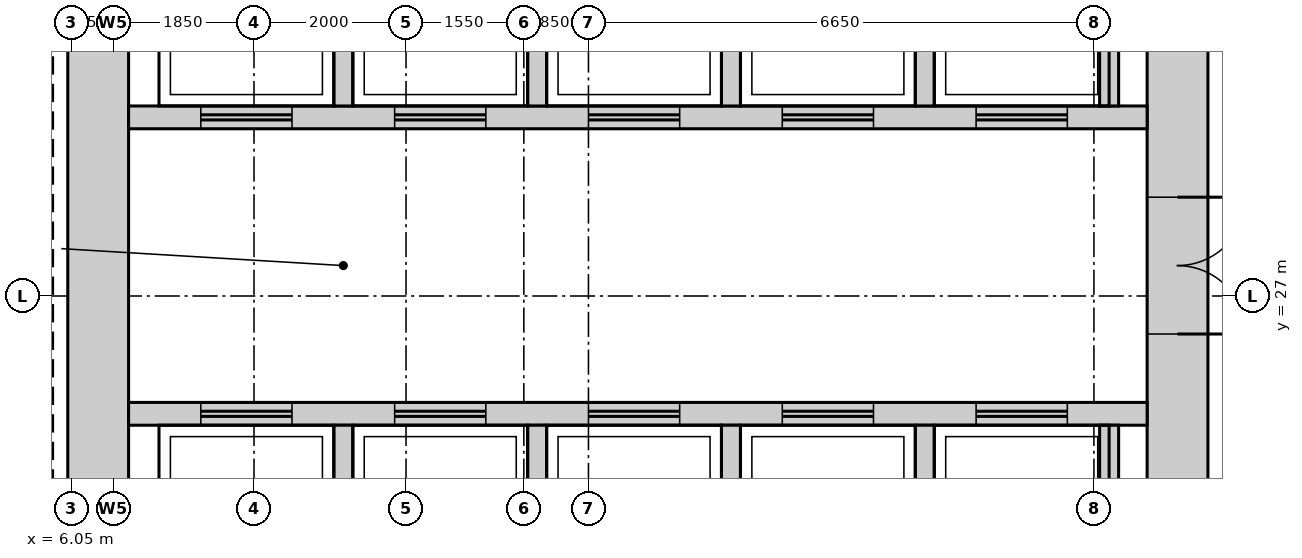
"""IFC4 building model, lengths in metres.
Left out: names, types, materials, properties, quantities, classifications, styles, units other than length and angle.
Written with IfcOpenShell. Run it as: python <this file> out.ifc"""

import sys

from ifc_helpers import new_model, si_unit, direction, frame, frame_2d, origin, place, context, subcontext, project, spatial, rectangle, extrude, source, transform, mapped, element, fill, save


model = new_model("IFC4")
c1 = context("Model", 3, precision=1e-05, world=origin(), true_north=direction((0.0, 1.0)))
c2 = subcontext(c1, "Body", "Model", "MODEL_VIEW")
j1 = project(units=[si_unit("LENGTHUNIT", "METRE"), si_unit("PLANEANGLEUNIT", "RADIAN")], contexts=[c1])
p1 = place(None, origin())
s1 = spatial("IfcSite", under=j1, at=p1, CompositionType="ELEMENT")
p2 = place(p1, origin())
s2 = spatial("IfcBuilding", under=s1, at=p2, CompositionType="ELEMENT")
p3 = place(p2, frame((0.0, 0.0, 204.7)))
s3 = spatial("IfcBuildingStorey", under=s2, at=p3, CompositionType="ELEMENT", Elevation=204.7)
m1 = source(origin(), c2, "Body", "SweptSolid", [
    extrude(rectangle(XDim=22.4, YDim=0.8, at=frame_2d((11.2, 0.0))), origin(), (0.0, 0.0, 1.0), 3.75),
])
p4 = place(p3, frame((20.6, 15.8, 0.0), z_axis=(0.0, 0.0, 1.0), x_axis=(0.0, 1.0, 0.0)))
e1 = element("IfcWall", 1, at=p4, inside=s3, PredefinedType="SHEAR", context=c2, shape_type="MappedRepresentation", body=[
    mapped(m1, transform((0.0, 0.0, 0.0))),
])
m2 = source(origin(), c2, "Body", "SweptSolid", [
    extrude(rectangle(XDim=1.8, YDim=2.1, at=frame_2d((0.9, 1.05))), frame((0.0, 0.41, 0.0), z_axis=(0.0, -1.0, 0.0), x_axis=(1.0, 0.0, 0.0)), (0.0, 0.0, 1.0), 0.82),
])
p5 = place(p4, frame((10.7, 0.0, 0.0)))
e2 = element("IfcOpeningElement", 2, at=p5, cuts=e1, PredefinedType="OPENING", context=c2, shape_type="MappedRepresentation", body=[
    mapped(m2, transform((0.0, 0.0, 0.0))),
])
m3 = source(origin(), c2, "Body", "SweptSolid", [
    extrude(rectangle(XDim=0.9, YDim=2.1, at=frame_2d((0.45, 1.05))), frame((0.0, 0.41, 0.0), z_axis=(0.0, -1.0, 0.0), x_axis=(1.0, 0.0, 0.0)), (0.0, 0.0, 1.0), 0.82),
])
p6 = place(p4, frame((0.35, 0.0, 0.0)))
e3 = element("IfcOpeningElement", 3, at=p6, cuts=e1, PredefinedType="OPENING", context=c2, shape_type="MappedRepresentation", body=[
    mapped(m3, transform((0.0, 0.0, 0.0))),
])
p7 = place(p4, frame((2.8, 0.0, 0.0)))
e4 = element("IfcOpeningElement", 4, at=p7, cuts=e1, PredefinedType="OPENING", context=c2, shape_type="MappedRepresentation", body=[
    mapped(m3, transform((0.0, 0.0, 0.0))),
])
m4 = source(origin(), c2, "Body", "SweptSolid", [
    extrude(rectangle(XDim=1.0, YDim=2.1, at=frame_2d((0.5, 1.05))), frame((0.0, 0.41, 0.0), z_axis=(0.0, -1.0, 0.0), x_axis=(1.0, 0.0, 0.0)), (0.0, 0.0, 1.0), 0.82),
])
p8 = place(p4, frame((5.5, 0.0, 0.0)))
e5 = element("IfcOpeningElement", 5, at=p8, cuts=e1, PredefinedType="OPENING", context=c2, shape_type="MappedRepresentation", body=[
    mapped(m4, transform((0.0, 0.0, 0.0))),
])
p9 = place(p3, frame((6.4, 15.8, 0.0), z_axis=(0.0, 0.0, 1.0), x_axis=(0.0, 1.0, 0.0)))
e6 = element("IfcWall", 6, at=p9, inside=s3, PredefinedType="SHEAR", context=c2, shape_type="MappedRepresentation", body=[
    mapped(m1, transform((0.0, 0.0, 0.0))),
])
m5 = source(origin(), c2, "Body", "SweptSolid", [
    extrude(rectangle(XDim=13.4, YDim=0.3, at=frame_2d((6.7, 0.0))), origin(), (0.0, 0.0, 1.0), 3.75),
])
p10 = place(p3, frame((6.8, 29.35, 0.0), z_axis=(0.0, 0.0, 1.0), x_axis=(1.0, 0.0, 0.0)))
e7 = element("IfcWall", 7, at=p10, inside=s3, PredefinedType="STANDARD", context=c2, shape_type="MappedRepresentation", body=[
    mapped(m5, transform((0.0, 0.0, 0.0))),
])
m6 = source(origin(), c2, "Body", "SweptSolid", [
    extrude(rectangle(XDim=1.2, YDim=2.1, at=frame_2d((0.6, 1.05))), frame((0.0, 0.16, 0.0), z_axis=(0.0, -1.0, 0.0), x_axis=(1.0, 0.0, 0.0)), (0.0, 0.0, 1.0), 0.32),
])
p11 = place(p10, frame((0.95, 0.0, 0.0)))
e8 = element("IfcOpeningElement", 8, at=p11, cuts=e7, PredefinedType="OPENING", context=c2, shape_type="MappedRepresentation", body=[
    mapped(m6, transform((0.0, 0.0, 0.0))),
])
p12 = place(p10, frame((3.5, 0.0, 0.0)))
e9 = element("IfcOpeningElement", 9, at=p12, cuts=e7, PredefinedType="OPENING", context=c2, shape_type="MappedRepresentation", body=[
    mapped(m6, transform((0.0, 0.0, 0.0))),
])
p13 = place(p10, frame((6.05, 0.0, 0.0)))
e10 = element("IfcOpeningElement", 10, at=p13, cuts=e7, PredefinedType="OPENING", context=c2, shape_type="MappedRepresentation", body=[
    mapped(m6, transform((0.0, 0.0, 0.0))),
])
p14 = place(p10, frame((8.6, 0.0, 0.0)))
e11 = element("IfcOpeningElement", 11, at=p14, cuts=e7, PredefinedType="OPENING", context=c2, shape_type="MappedRepresentation", body=[
    mapped(m6, transform((0.0, 0.0, 0.0))),
])
p15 = place(p10, frame((11.15, 0.0, 0.0)))
e12 = element("IfcOpeningElement", 12, at=p15, cuts=e7, PredefinedType="OPENING", context=c2, shape_type="MappedRepresentation", body=[
    mapped(m6, transform((0.0, 0.0, 0.0))),
])
p16 = place(p3, frame((6.8, 25.45, 0.0), z_axis=(0.0, 0.0, 1.0), x_axis=(1.0, 0.0, 0.0)))
e13 = element("IfcWall", 13, at=p16, inside=s3, PredefinedType="STANDARD", context=c2, shape_type="MappedRepresentation", body=[
    mapped(m5, transform((0.0, 0.0, 0.0))),
])
p17 = place(p16, frame((0.95, 0.0, 0.0)))
e14 = element("IfcOpeningElement", 14, at=p17, cuts=e13, PredefinedType="OPENING", context=c2, shape_type="MappedRepresentation", body=[
    mapped(m6, transform((0.0, 0.0, 0.0))),
])
p18 = place(p16, frame((3.5, 0.0, 0.0)))
e15 = element("IfcOpeningElement", 15, at=p18, cuts=e13, PredefinedType="OPENING", context=c2, shape_type="MappedRepresentation", body=[
    mapped(m6, transform((0.0, 0.0, 0.0))),
])
p19 = place(p16, frame((6.05, 0.0, 0.0)))
e16 = element("IfcOpeningElement", 16, at=p19, cuts=e13, PredefinedType="OPENING", context=c2, shape_type="MappedRepresentation", body=[
    mapped(m6, transform((0.0, 0.0, 0.0))),
])
p20 = place(p16, frame((8.6, 0.0, 0.0)))
e17 = element("IfcOpeningElement", 17, at=p20, cuts=e13, PredefinedType="OPENING", context=c2, shape_type="MappedRepresentation", body=[
    mapped(m6, transform((0.0, 0.0, 0.0))),
])
p21 = place(p16, frame((11.15, 0.0, 0.0)))
e18 = element("IfcOpeningElement", 18, at=p21, cuts=e13, PredefinedType="OPENING", context=c2, shape_type="MappedRepresentation", body=[
    mapped(m6, transform((0.0, 0.0, 0.0))),
])
m7 = source(origin(), c2, "Body", "SweptSolid", [
    extrude(rectangle(XDim=2.4, YDim=0.25, at=frame_2d((1.2, 0.0))), origin(), (0.0, 0.0, 1.0), 3.75),
])
for number, where, z_axis, x_axis in (
    (19, (17.275, 29.5, 0.0), (0.0, 0.0, 1.0), (0.0, 1.0, 0.0)),
    (20, (19.7, 29.5, 0.0), (0.0, 0.0, 1.0), (0.0, 1.0, 0.0)),
    (21, (9.625, 29.5, 0.0), (0.0, 0.0, 1.0), (0.0, 1.0, 0.0)),
    (22, (12.175, 29.5, 0.0), (0.0, 0.0, 1.0), (0.0, 1.0, 0.0)),
    (23, (14.725, 29.5, 0.0), (0.0, 0.0, 1.0), (0.0, 1.0, 0.0)),
):
    element("IfcWall", number, at=place(p3, frame(where, z_axis=z_axis, x_axis=x_axis)), inside=s3, PredefinedType="STANDARD", context=c2, shape_type="MappedRepresentation", body=[
        mapped(m7, transform((0.0, 0.0, 0.0))),
    ])
m8 = source(origin(), c2, "Body", "SweptSolid", [
    extrude(rectangle(XDim=2.4, YDim=0.25, at=frame_2d((1.2, 0.0))), origin(), (0.0, 0.0, 1.0), 3.75),
])
for number, where, z_axis, x_axis in (
    (24, (17.275, 22.9, 0.0), (0.0, 0.0, 1.0), (0.0, 1.0, 0.0)),
    (25, (19.7, 22.9, 0.0), (0.0, 0.0, 1.0), (0.0, 1.0, 0.0)),
    (26, (9.625, 22.9, 0.0), (0.0, 0.0, 1.0), (0.0, 1.0, 0.0)),
    (27, (12.175, 22.9, 0.0), (0.0, 0.0, 1.0), (0.0, 1.0, 0.0)),
    (28, (14.725, 22.9, 0.0), (0.0, 0.0, 1.0), (0.0, 1.0, 0.0)),
):
    element("IfcWall", number, at=place(p3, frame(where, z_axis=z_axis, x_axis=x_axis)), inside=s3, PredefinedType="STANDARD", context=c2, shape_type="MappedRepresentation", body=[
        mapped(m8, transform((0.0, 0.0, 0.0))),
    ])
m9 = source(origin(), c2, "Body", "SweptSolid", [
    extrude(rectangle(XDim=1.8, YDim=2.1, at=frame_2d((0.9, 1.05))), frame((0.0, 0.35, 0.0), z_axis=(0.0, -1.0, 0.0), x_axis=(1.0, 0.0, 0.0)), (0.0, 0.0, 1.0), 0.7),
])
p22 = place(p5, origin())
e29 = element("IfcDoor", 29, at=p22, inside=s3, OperationType="DOUBLE_DOOR_SINGLE_SWING", PredefinedType="DOOR", context=c2, shape_type="MappedRepresentation", body=[
    mapped(m9, transform((0.0, 0.0, 0.0))),
])
fill(e2, e29)
m10 = source(origin(), c2, "Body", "SweptSolid", [
    extrude(rectangle(XDim=1.2, YDim=2.1, at=frame_2d((0.6, 1.05))), frame((0.0, 0.025, 0.0), z_axis=(0.0, -1.0, 0.0), x_axis=(1.0, 0.0, 0.0)), (0.0, 0.0, 1.0), 0.05),
])
p23 = place(p17, origin())
e30 = element("IfcDoor", 30, at=p23, inside=s3, OperationType="DOUBLE_DOOR_SLIDING", PredefinedType="DOOR", context=c2, shape_type="MappedRepresentation", body=[
    mapped(m10, transform((0.0, 0.0, 0.0))),
])
fill(e14, e30)
p24 = place(p18, origin())
e31 = element("IfcDoor", 31, at=p24, inside=s3, OperationType="DOUBLE_DOOR_SLIDING", PredefinedType="DOOR", context=c2, shape_type="MappedRepresentation", body=[
    mapped(m10, transform((0.0, 0.0, 0.0))),
])
fill(e15, e31)
p25 = place(p19, origin())
e32 = element("IfcDoor", 32, at=p25, inside=s3, OperationType="DOUBLE_DOOR_SLIDING", PredefinedType="DOOR", context=c2, shape_type="MappedRepresentation", body=[
    mapped(m10, transform((0.0, 0.0, 0.0))),
])
fill(e16, e32)
p26 = place(p20, origin())
e33 = element("IfcDoor", 33, at=p26, inside=s3, OperationType="DOUBLE_DOOR_SLIDING", PredefinedType="DOOR", context=c2, shape_type="MappedRepresentation", body=[
    mapped(m10, transform((0.0, 0.0, 0.0))),
])
fill(e17, e33)
p27 = place(p21, origin())
e34 = element("IfcDoor", 34, at=p27, inside=s3, OperationType="DOUBLE_DOOR_SLIDING", PredefinedType="DOOR", context=c2, shape_type="MappedRepresentation", body=[
    mapped(m10, transform((0.0, 0.0, 0.0))),
])
fill(e18, e34)
p28 = place(p11, origin())
e35 = element("IfcDoor", 35, at=p28, inside=s3, OperationType="DOUBLE_DOOR_SLIDING", PredefinedType="DOOR", context=c2, shape_type="MappedRepresentation", body=[
    mapped(m10, transform((0.0, 0.0, 0.0))),
])
fill(e8, e35)
p29 = place(p12, origin())
e36 = element("IfcDoor", 36, at=p29, inside=s3, OperationType="DOUBLE_DOOR_SLIDING", PredefinedType="DOOR", context=c2, shape_type="MappedRepresentation", body=[
    mapped(m10, transform((0.0, 0.0, 0.0))),
])
fill(e9, e36)
p30 = place(p13, origin())
e37 = element("IfcDoor", 37, at=p30, inside=s3, OperationType="DOUBLE_DOOR_SLIDING", PredefinedType="DOOR", context=c2, shape_type="MappedRepresentation", body=[
    mapped(m10, transform((0.0, 0.0, 0.0))),
])
fill(e10, e37)
p31 = place(p14, origin())
e38 = element("IfcDoor", 38, at=p31, inside=s3, OperationType="DOUBLE_DOOR_SLIDING", PredefinedType="DOOR", context=c2, shape_type="MappedRepresentation", body=[
    mapped(m10, transform((0.0, 0.0, 0.0))),
])
fill(e11, e38)
p32 = place(p15, origin())
e39 = element("IfcDoor", 39, at=p32, inside=s3, OperationType="DOUBLE_DOOR_SLIDING", PredefinedType="DOOR", context=c2, shape_type="MappedRepresentation", body=[
    mapped(m10, transform((0.0, 0.0, 0.0))),
])
fill(e12, e39)
save(model, sys.argv[1])
